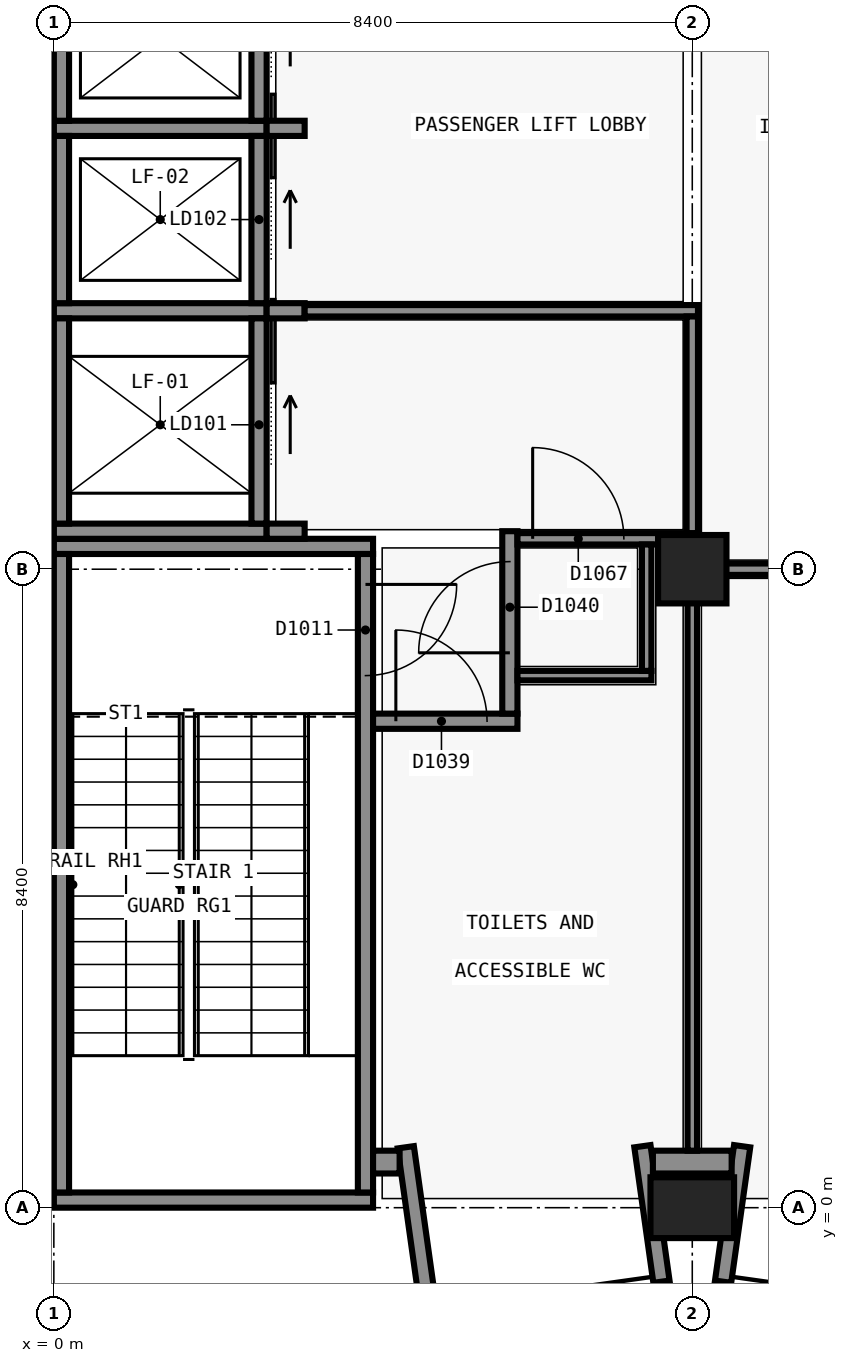
"""IFC4 building model, lengths in metres.
Left out: names, types, materials, properties, quantities, classifications, styles, units other than length and angle.
Written with IfcOpenShell. Run it as: python <this file> out.ifc"""

import sys

from ifc_helpers import new_model, si_unit, direction, frame, frame_2d, origin, origin_2d, place, context, subcontext, project, spatial, rectangle, extrude, element, fill, save


model = new_model("IFC4")
c1 = context("Model", 3, precision=1e-05, world=origin(), true_north=direction((0.0, 1.0)))
c2 = subcontext(c1, "Body", "Model", "MODEL_VIEW")
j1 = project(units=[si_unit("LENGTHUNIT", "METRE"), si_unit("PLANEANGLEUNIT", "RADIAN")], contexts=[c1])
p1 = place(None, origin())
s1 = spatial("IfcSite", under=j1, at=p1, CompositionType="ELEMENT")
p2 = place(p1, origin())
s2 = spatial("IfcBuilding", under=s1, at=p2, CompositionType="ELEMENT")
p3 = place(p2, frame((0.0, 0.0, 5.4)))
s3 = spatial("IfcBuildingStorey", under=s2, at=p3, CompositionType="ELEMENT", Elevation=5.4)
for number, where, z_axis, x_axis in (
    (1, (4.2, 0.1, 0.0), (0.0, 0.0, 1.0), (-1.0, 0.0, 0.0)),
    (2, (0.0, 8.7, 0.0), (0.0, 0.0, 1.0), (1.0, 0.0, 0.0)),
):
    element("IfcWall", number, at=place(p3, frame(where, z_axis=z_axis, x_axis=x_axis)), inside=s3, PredefinedType="SHEAR", context=c2, shape_type="SweptSolid", body=[
        extrude(rectangle(XDim=4.199, YDim=0.2, at=frame_2d((2.1, 0.0))), origin(), (0.0, 0.0, 1.0), 4.8),
    ])
p4 = place(p3, frame((0.1, 0.2, 0.0), z_axis=(0.0, 0.0, 1.0), x_axis=(0.0, 1.0, 0.0)))
e3 = element("IfcWall", 3, at=p4, inside=s3, PredefinedType="SHEAR", context=c2, shape_type="SweptSolid", body=[
    extrude(rectangle(XDim=8.4, YDim=0.2, at=frame_2d((4.2, 0.0))), origin(), (0.0, 0.0, 1.0), 4.8),
])
p5 = place(p3, frame((4.1, 8.6, 0.0), z_axis=(0.0, 0.0, 1.0), x_axis=(0.0, -1.0, 0.0)))
e4 = element("IfcWall", 4, at=p5, inside=s3, PredefinedType="SHEAR", context=c2, shape_type="SweptSolid", body=[
    extrude(rectangle(XDim=8.4, YDim=0.2, at=frame_2d((4.2, 0.0))), origin(), (0.0, 0.0, 1.0), 4.8),
])
p6 = place(p5, frame((0.4, 0.0, 0.0)))
e5 = element("IfcOpeningElement", 5, at=p6, cuts=e4, PredefinedType="OPENING", context=c2, shape_type="SweptSolid", body=[
    extrude(rectangle(XDim=1.2, YDim=2.1, at=frame_2d((0.6, 1.05))), frame((0.0, 0.11, 0.0), z_axis=(0.0, -1.0, 0.0), x_axis=(1.0, 0.0, 0.0)), (0.0, 0.0, 1.0), 0.22),
])
for number, where, z_axis, x_axis in (
    (6, (2.8, 8.9, 0.0), (0.0, 0.0, 1.0), (-1.0, 0.0, 0.0)),
    (7, (0.0, 11.8, 0.0), (0.0, 0.0, 1.0), (1.0, 0.0, 0.0)),
):
    element("IfcWall", number, at=place(p3, frame(where, z_axis=z_axis, x_axis=x_axis)), inside=s3, PredefinedType="SHEAR", context=c2, shape_type="SweptSolid", body=[
        extrude(rectangle(XDim=2.8, YDim=0.2, at=frame_2d((1.4, 0.0))), origin(), (0.0, 0.0, 1.0), 4.8),
    ])
p7 = place(p3, frame((0.1, 9.0, 0.0), z_axis=(0.0, 0.0, 1.0), x_axis=(0.0, 1.0, 0.0)))
e8 = element("IfcWall", 8, at=p7, inside=s3, PredefinedType="SHEAR", context=c2, shape_type="SweptSolid", body=[
    extrude(rectangle(XDim=2.7, YDim=0.2, at=frame_2d((1.35, 0.0))), origin(), (0.0, 0.0, 1.0), 4.8),
])
p8 = place(p3, frame((2.7, 11.7, 0.0), z_axis=(0.0, 0.0, 1.0), x_axis=(0.0, -1.0, 0.0)))
e9 = element("IfcWall", 9, at=p8, inside=s3, PredefinedType="SHEAR", context=c2, shape_type="SweptSolid", body=[
    extrude(rectangle(XDim=2.7, YDim=0.2, at=frame_2d((1.35, 0.0))), origin(), (0.0, 0.0, 1.0), 4.8),
])
p9 = place(p8, frame((0.85, 0.0, 0.0)))
e10 = element("IfcOpeningElement", 10, at=p9, cuts=e9, PredefinedType="OPENING", context=c2, shape_type="SweptSolid", body=[
    extrude(rectangle(XDim=1.1, YDim=2.1, at=frame_2d((0.55, 1.05))), frame((0.0, 0.11, 0.0), z_axis=(0.0, -1.0, 0.0), x_axis=(1.0, 0.0, 0.0)), (0.0, 0.0, 1.0), 0.22),
])
p10 = place(p3, frame((0.0, 14.2, 0.0), z_axis=(0.0, 0.0, 1.0), x_axis=(1.0, 0.0, 0.0)))
e11 = element("IfcWall", 11, at=p10, inside=s3, PredefinedType="SHEAR", context=c2, shape_type="SweptSolid", body=[
    extrude(rectangle(XDim=2.8, YDim=0.2, at=frame_2d((1.4, 0.0))), origin(), (0.0, 0.0, 1.0), 4.8),
])
p11 = place(p3, frame((0.1, 11.9, 0.0), z_axis=(0.0, 0.0, 1.0), x_axis=(0.0, 1.0, 0.0)))
e12 = element("IfcWall", 12, at=p11, inside=s3, PredefinedType="SHEAR", context=c2, shape_type="SweptSolid", body=[
    extrude(rectangle(XDim=2.2, YDim=0.2, at=frame_2d((1.1, 0.0))), origin(), (0.0, 0.0, 1.0), 4.8),
])
p12 = place(p3, frame((2.7, 14.1, 0.0), z_axis=(0.0, 0.0, 1.0), x_axis=(0.0, -1.0, 0.0)))
e13 = element("IfcWall", 13, at=p12, inside=s3, PredefinedType="SHEAR", context=c2, shape_type="SweptSolid", body=[
    extrude(rectangle(XDim=2.2, YDim=0.2, at=frame_2d((1.1, 0.0))), origin(), (0.0, 0.0, 1.0), 4.8),
])
p13 = place(p12, frame((0.55, 0.0, 0.0)))
e14 = element("IfcOpeningElement", 14, at=p13, cuts=e13, PredefinedType="OPENING", context=c2, shape_type="SweptSolid", body=[
    extrude(rectangle(XDim=1.1, YDim=2.1, at=frame_2d((0.55, 1.05))), frame((0.0, 0.11, 0.0), z_axis=(0.0, -1.0, 0.0), x_axis=(1.0, 0.0, 0.0)), (0.0, 0.0, 1.0), 0.22),
])
p14 = place(p3, frame((0.1, 14.3, 0.0), z_axis=(0.0, 0.0, 1.0), x_axis=(0.0, 1.0, 0.0)))
e15 = element("IfcWall", 15, at=p14, inside=s3, PredefinedType="SHEAR", context=c2, shape_type="SweptSolid", body=[
    extrude(rectangle(XDim=2.1, YDim=0.2, at=frame_2d((1.05, 0.0))), origin(), (0.0, 0.0, 1.0), 4.8),
])
p15 = place(p3, frame((2.7, 16.4, 0.0), z_axis=(0.0, 0.0, 1.0), x_axis=(0.0, -1.0, 0.0)))
e16 = element("IfcWall", 16, at=p15, inside=s3, PredefinedType="SHEAR", context=c2, shape_type="SweptSolid", body=[
    extrude(rectangle(XDim=2.1, YDim=0.2, at=frame_2d((1.05, 0.0))), origin(), (0.0, 0.0, 1.0), 4.8),
])
p16 = place(p15, frame((0.45, 0.0, 0.0)))
e17 = element("IfcOpeningElement", 17, at=p16, cuts=e16, PredefinedType="OPENING", context=c2, shape_type="SweptSolid", body=[
    extrude(rectangle(XDim=1.1, YDim=2.1, at=frame_2d((0.55, 1.05))), frame((0.0, 0.11, 0.0), z_axis=(0.0, -1.0, 0.0), x_axis=(1.0, 0.0, 0.0)), (0.0, 0.0, 1.0), 0.22),
])
p17 = place(p3, frame((8.4, 0.0, 0.0), z_axis=(0.0, 0.0, 1.0), x_axis=(1.0, 0.0, 0.0)))
e18 = element("IfcColumn", 18, at=p17, inside=s3, PredefinedType="COLUMN", context=c2, shape_type="SweptSolid", body=[
    extrude(rectangle(XDim=1.1, YDim=0.8, at=origin_2d()), origin(), (0.0, 0.0, 1.0), 4.8),
])
p18 = place(p3, frame((8.4, 8.4, 0.0), z_axis=(0.0, 0.0, 1.0), x_axis=(1.0, 0.0, 0.0)))
e19 = element("IfcColumn", 19, at=p18, inside=s3, PredefinedType="COLUMN", context=c2, shape_type="SweptSolid", body=[
    extrude(rectangle(XDim=0.9, YDim=0.9, at=origin_2d()), origin(), (0.0, 0.0, 1.0), 4.8),
])
for number, where, z_axis, x_axis in (
    (20, (3.3, 8.9, 0.0), (0.0, 0.0, 1.0), (-1.0, 0.0, 0.0)),
    (21, (2.8, 11.8, 0.0), (0.0, 0.0, 1.0), (1.0, 0.0, 0.0)),
    (22, (2.8, 14.2, 0.0), (0.0, 0.0, 1.0), (1.0, 0.0, 0.0)),
):
    element("IfcWall", number, at=place(p3, frame(where, z_axis=z_axis, x_axis=x_axis)), inside=s3, PredefinedType="SHEAR", context=c2, shape_type="SweptSolid", body=[
        extrude(rectangle(XDim=0.5, YDim=0.2, at=frame_2d((0.25, 0.0))), origin(), (0.0, 0.0, 1.0), 4.8),
    ])
p19 = place(p3, frame((4.631, 0.795, 0.0), z_axis=(0.0, 0.0, 1.0), x_axis=(0.139141913905, -0.990272451295, 0.0)))
e23 = element("IfcWall", 23, at=p19, inside=s3, PredefinedType="SOLIDWALL", context=c2, shape_type="SweptSolid", body=[
    extrude(rectangle(XDim=2.219, YDim=0.215, at=frame_2d((1.11, 0.0))), origin(), (0.0, 0.0, 1.0), 4.5),
])
for number, where, z_axis, x_axis in (
    (24, (7.744, 0.809, 0.0), (0.0, 0.0, 1.0), (0.139, -0.99, 0.0)),
    (25, (9.056, 0.809, 0.0), (0.0, 0.0, 1.0), (-0.139, -0.99, 0.0)),
):
    element("IfcWall", number, at=place(p3, frame(where, z_axis=z_axis, x_axis=x_axis)), inside=s3, PredefinedType="SOLIDWALL", context=c2, shape_type="SweptSolid", body=[
        extrude(rectangle(XDim=1.8, YDim=0.215, at=frame_2d((0.9, 0.0))), origin(), (0.0, 0.0, 1.0), 4.5),
    ])
p20 = place(p3, frame((4.55, 0.6, 0.0), z_axis=(0.0, 0.0, 1.0), x_axis=(-1.0, 0.0, 0.0)))
e26 = element("IfcWall", 26, at=p20, inside=s3, PredefinedType="SOLIDWALL", context=c2, shape_type="SweptSolid", body=[
    extrude(rectangle(XDim=0.349, YDim=0.3, at=frame_2d((0.175, 0.0))), origin(), (0.0, 0.0, 1.0), 4.5),
])
p21 = place(p3, frame((8.918, 0.6, 0.0), z_axis=(0.0, 0.0, 1.0), x_axis=(-1.0, 0.0, 0.0)))
e27 = element("IfcWall", 27, at=p21, inside=s3, PredefinedType="SOLIDWALL", context=c2, shape_type="SweptSolid", body=[
    extrude(rectangle(XDim=1.036, YDim=0.3, at=frame_2d((0.518, 0.0))), origin(), (0.0, 0.0, 1.0), 4.5),
])
p22 = place(p3, frame((4.2, 6.4, 0.0), z_axis=(0.0, 0.0, 1.0), x_axis=(1.0, 0.0, 0.0)))
e28 = element("IfcWall", 28, at=p22, inside=s3, PredefinedType="SOLIDWALL", context=c2, shape_type="SweptSolid", body=[
    extrude(rectangle(XDim=1.9, YDim=0.2, at=frame_2d((0.95, 0.0))), origin(), (0.0, 0.0, 1.0), 4.5),
])
p23 = place(p22, frame((0.3, 0.0, 0.0)))
e29 = element("IfcOpeningElement", 29, at=p23, cuts=e28, PredefinedType="OPENING", context=c2, shape_type="SweptSolid", body=[
    extrude(rectangle(XDim=1.2, YDim=2.1, at=frame_2d((0.6, 1.05))), frame((0.0, 0.11, 0.0), z_axis=(0.0, -1.0, 0.0), x_axis=(1.0, 0.0, 0.0)), (0.0, 0.0, 1.0), 0.22),
])
p24 = place(p3, frame((6.0, 6.5, 0.0), z_axis=(0.0, 0.0, 1.0), x_axis=(0.0, 1.0, 0.0)))
e30 = element("IfcWall", 30, at=p24, inside=s3, PredefinedType="SOLIDWALL", context=c2, shape_type="SweptSolid", body=[
    extrude(rectangle(XDim=2.4, YDim=0.2, at=frame_2d((1.2, 0.0))), origin(), (0.0, 0.0, 1.0), 4.0),
])
p25 = place(p24, frame((0.8, 0.0, 0.0)))
e31 = element("IfcOpeningElement", 31, at=p25, cuts=e30, PredefinedType="OPENING", context=c2, shape_type="SweptSolid", body=[
    extrude(rectangle(XDim=1.2, YDim=2.1, at=frame_2d((0.6, 1.05))), frame((0.0, 0.11, 0.0), z_axis=(0.0, -1.0, 0.0), x_axis=(1.0, 0.0, 0.0)), (0.0, 0.0, 1.0), 0.22),
])
p26 = place(p3, frame((8.325, 8.4, 0.0), z_axis=(0.0, 0.0, 1.0), x_axis=(1.0, 0.0, 0.0)))
e32 = element("IfcWall", 32, at=p26, inside=s3, PredefinedType="PARTITIONING", context=c2, shape_type="SweptSolid", body=[
    extrude(rectangle(XDim=19.175, YDim=0.15, at=frame_2d((9.587, 0.0))), origin(), (0.0, 0.0, 1.0), 3.8),
])
p27 = place(p3, frame((6.1, 8.8, 0.0), z_axis=(0.0, 0.0, 1.0), x_axis=(1.0, 0.0, 0.0)))
e33 = element("IfcWall", 33, at=p27, inside=s3, PredefinedType="SOLIDWALL", context=c2, shape_type="SweptSolid", body=[
    extrude(rectangle(XDim=2.375, YDim=0.15, at=frame_2d((1.188, 0.0))), origin(), (0.0, 0.0, 1.0), 3.8),
])
p28 = place(p27, frame((0.2, 0.0, 0.0)))
e34 = element("IfcOpeningElement", 34, at=p28, cuts=e33, PredefinedType="OPENING", context=c2, shape_type="SweptSolid", body=[
    extrude(rectangle(XDim=1.2, YDim=2.1, at=frame_2d((0.6, 1.05))), frame((0.0, 0.085, 0.0), z_axis=(0.0, -1.0, 0.0), x_axis=(1.0, 0.0, 0.0)), (0.0, 0.0, 1.0), 0.17),
])
p29 = place(p3, frame((3.3, 11.8, 0.0), z_axis=(0.0, 0.0, 1.0), x_axis=(1.0, 0.0, 0.0)))
e35 = element("IfcWall", 35, at=p29, inside=s3, PredefinedType="SOLIDWALL", context=c2, shape_type="SweptSolid", body=[
    extrude(rectangle(XDim=5.175, YDim=0.15, at=frame_2d((2.587, 0.0))), origin(), (0.0, 0.0, 1.0), 3.8),
])
p30 = place(p3, frame((8.4, 8.475, 0.0), z_axis=(0.0, 0.0, 1.0), x_axis=(0.0, 1.0, 0.0)))
e36 = element("IfcWall", 36, at=p30, inside=s3, PredefinedType="PARTITIONING", context=c2, shape_type="SweptSolid", body=[
    extrude(rectangle(XDim=0.25, YDim=0.15, at=frame_2d((0.125, 0.0))), origin(), (0.0, 0.0, 1.0), 3.8),
])
p31 = place(p3, frame((8.4, 8.875, 0.0), z_axis=(0.0, 0.0, 1.0), x_axis=(0.0, 1.0, 0.0)))
e37 = element("IfcWall", 37, at=p31, inside=s3, PredefinedType="SOLIDWALL", context=c2, shape_type="SweptSolid", body=[
    extrude(rectangle(XDim=2.85, YDim=0.15, at=frame_2d((1.425, 0.0))), origin(), (0.0, 0.0, 1.0), 3.8),
])
p32 = place(p3, frame((6.1, 7.0, 0.0), z_axis=(0.0, 0.0, 1.0), x_axis=(1.0, 0.0, 0.0)))
e38 = element("IfcWall", 38, at=p32, inside=s3, PredefinedType="PARTITIONING", context=c2, shape_type="SweptSolid", body=[
    extrude(rectangle(XDim=1.762, YDim=0.125, at=frame_2d((0.881, 0.0))), origin(), (0.0, 0.0, 1.0), 4.5),
])
p33 = place(p3, frame((7.8, 7.062, 0.0), z_axis=(0.0, 0.0, 1.0), x_axis=(0.0, 1.0, 0.0)))
e39 = element("IfcWall", 39, at=p33, inside=s3, PredefinedType="PARTITIONING", context=c2, shape_type="SweptSolid", body=[
    extrude(rectangle(XDim=1.663, YDim=0.125, at=frame_2d((0.831, 0.0))), origin(), (0.0, 0.0, 1.0), 4.0),
])
p34 = place(p3, frame((8.4, 0.75, 0.0), z_axis=(0.0, 0.0, 1.0), x_axis=(0.0, 1.0, 0.0)))
e40 = element("IfcWall", 40, at=p34, inside=s3, PredefinedType="PARTITIONING", context=c2, shape_type="SweptSolid", body=[
    extrude(rectangle(XDim=7.575, YDim=0.125, at=frame_2d((3.788, 0.0))), origin(), (0.0, 0.0, 1.0), 3.8),
])
p35 = place(p9, origin())
e41 = element("IfcDoor", 41, at=p35, inside=s3, OperationType="SLIDING_TO_LEFT", PredefinedType="DOOR", context=c2, shape_type="SweptSolid", body=[
    extrude(rectangle(XDim=1.1, YDim=2.1, at=frame_2d((0.55, 1.05))), frame((0.0, 0.025, 0.0), z_axis=(0.0, -1.0, 0.0), x_axis=(1.0, 0.0, 0.0)), (0.0, 0.0, 1.0), 0.05),
])
fill(e10, e41)
p36 = place(p13, origin())
e42 = element("IfcDoor", 42, at=p36, inside=s3, OperationType="SLIDING_TO_LEFT", PredefinedType="DOOR", context=c2, shape_type="SweptSolid", body=[
    extrude(rectangle(XDim=1.1, YDim=2.1, at=frame_2d((0.55, 1.05))), frame((0.0, 0.025, 0.0), z_axis=(0.0, -1.0, 0.0), x_axis=(1.0, 0.0, 0.0)), (0.0, 0.0, 1.0), 0.05),
])
fill(e14, e42)
p37 = place(p16, origin())
e43 = element("IfcDoor", 43, at=p37, inside=s3, OperationType="SLIDING_TO_LEFT", PredefinedType="DOOR", context=c2, shape_type="SweptSolid", body=[
    extrude(rectangle(XDim=1.1, YDim=2.1, at=frame_2d((0.55, 1.05))), frame((0.0, 0.025, 0.0), z_axis=(0.0, -1.0, 0.0), x_axis=(1.0, 0.0, 0.0)), (0.0, 0.0, 1.0), 0.05),
])
fill(e17, e43)
p38 = place(p6, origin())
e44 = element("IfcDoor", 44, at=p38, inside=s3, OperationType="SINGLE_SWING_RIGHT", PredefinedType="DOOR", context=c2, shape_type="SweptSolid", body=[
    extrude(rectangle(XDim=1.2, YDim=2.1, at=frame_2d((0.6, 1.05))), frame((0.0, 0.025, 0.0), z_axis=(0.0, -1.0, 0.0), x_axis=(1.0, 0.0, 0.0)), (0.0, 0.0, 1.0), 0.05),
])
fill(e5, e44)
p39 = place(p23, origin())
e45 = element("IfcDoor", 45, at=p39, inside=s3, OperationType="SINGLE_SWING_LEFT", PredefinedType="DOOR", context=c2, shape_type="SweptSolid", body=[
    extrude(rectangle(XDim=1.2, YDim=2.1, at=frame_2d((0.6, 1.05))), frame((0.0, 0.025, 0.0), z_axis=(0.0, -1.0, 0.0), x_axis=(1.0, 0.0, 0.0)), (0.0, 0.0, 1.0), 0.05),
])
fill(e29, e45)
p40 = place(p25, origin())
e46 = element("IfcDoor", 46, at=p40, inside=s3, OperationType="SINGLE_SWING_RIGHT", PredefinedType="DOOR", context=c2, shape_type="SweptSolid", body=[
    extrude(rectangle(XDim=1.2, YDim=2.1, at=frame_2d((0.6, 1.05))), frame((0.0, 0.025, 0.0), z_axis=(0.0, -1.0, 0.0), x_axis=(1.0, 0.0, 0.0)), (0.0, 0.0, 1.0), 0.05),
])
fill(e31, e46)
p41 = place(p28, origin())
e47 = element("IfcDoor", 47, at=p41, inside=s3, OperationType="SINGLE_SWING_RIGHT", PredefinedType="DOOR", context=c2, shape_type="SweptSolid", body=[
    extrude(rectangle(XDim=1.2, YDim=2.1, at=frame_2d((0.6, 1.05))), frame((0.0, 0.025, 0.0), z_axis=(0.0, -1.0, 0.0), x_axis=(1.0, 0.0, 0.0)), (0.0, 0.0, 1.0), 0.05),
])
fill(e34, e47)
save(model, sys.argv[1])
